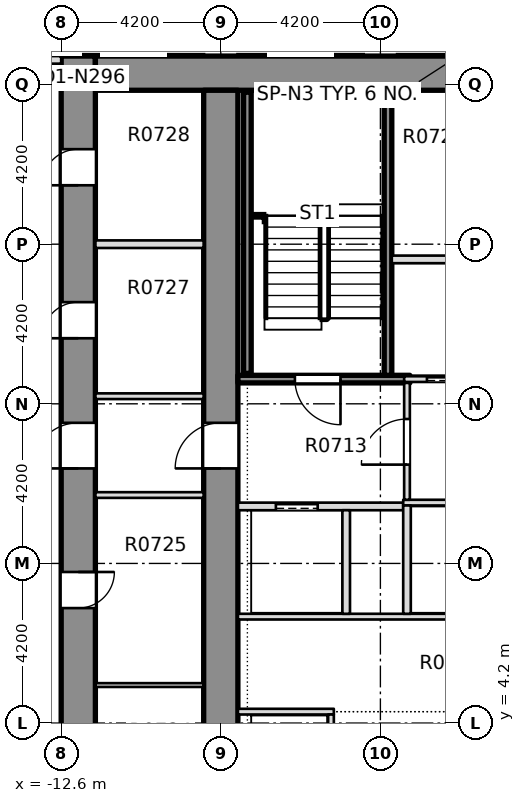
"""IFC4 building model, lengths in metres.
Left out: names, types, materials, properties, quantities, classifications, styles, units other than length and angle.
Written with IfcOpenShell. Run it as: python <this file> out.ifc"""

import sys

from ifc_helpers import new_model, si_unit, direction, frame, frame_2d, origin, place, context, subcontext, project, spatial, rectangle, extrude, element, fill, save


model = new_model("IFC4")
c1 = context("Model", 3, precision=1e-05, world=origin(), true_north=direction((0.0, 1.0)))
c2 = subcontext(c1, "Body", "Model", "MODEL_VIEW")
j1 = project(units=[si_unit("LENGTHUNIT", "METRE"), si_unit("PLANEANGLEUNIT", "RADIAN")], contexts=[c1])
p1 = place(None, origin())
s1 = spatial("IfcSite", under=j1, at=p1, CompositionType="ELEMENT")
p2 = place(p1, origin())
s2 = spatial("IfcBuilding", under=s1, at=p2, CompositionType="ELEMENT")
p3 = place(p2, frame((0.0, 0.0, 37.95)))
s3 = spatial("IfcBuildingStorey", under=s2, at=p3, CompositionType="ELEMENT", Elevation=37.95)
p4 = place(p3, frame((-12.15, -8.4, -0.32), z_axis=(0.0, 0.0, 1.0), x_axis=(0.0, 1.0, 0.0)))
e1 = element("IfcWall", 1, at=p4, inside=s3, PredefinedType="SHEAR", context=c2, shape_type="SweptSolid", body=[
    extrude(rectangle(XDim=30.15, YDim=0.9, at=frame_2d((15.075, 0.0))), origin(), (0.0, 0.0, 1.0), 3.45),
])
p5 = place(p4, frame((3.425, 0.0, 0.32)))
e2 = element("IfcOpeningElement", 2, at=p5, cuts=e1, PredefinedType="OPENING", context=c2, shape_type="SweptSolid", body=[
    extrude(rectangle(XDim=0.95, YDim=2.1, at=frame_2d((0.475, 1.05))), frame((0.0, 0.46, 0.0), z_axis=(0.0, -1.0, 0.0), x_axis=(1.0, 0.0, 0.0)), (0.0, 0.0, 1.0), 0.92),
])
p6 = place(p4, frame((8.075, 0.0, 0.32)))
e3 = element("IfcOpeningElement", 3, at=p6, cuts=e1, PredefinedType="OPENING", context=c2, shape_type="SweptSolid", body=[
    extrude(rectangle(XDim=0.95, YDim=2.1, at=frame_2d((0.475, 1.05))), frame((0.0, 0.46, 0.0), z_axis=(0.0, -1.0, 0.0), x_axis=(1.0, 0.0, 0.0)), (0.0, 0.0, 1.0), 0.92),
])
p7 = place(p4, frame((11.425, 0.0, 0.32)))
e4 = element("IfcOpeningElement", 4, at=p7, cuts=e1, PredefinedType="OPENING", context=c2, shape_type="SweptSolid", body=[
    extrude(rectangle(XDim=0.95, YDim=2.1, at=frame_2d((0.475, 1.05))), frame((0.0, 0.46, 0.0), z_axis=(0.0, -1.0, 0.0), x_axis=(1.0, 0.0, 0.0)), (0.0, 0.0, 1.0), 0.92),
])
p8 = place(p4, frame((15.625, 0.0, 0.32)))
e5 = element("IfcOpeningElement", 5, at=p8, cuts=e1, PredefinedType="OPENING", context=c2, shape_type="SweptSolid", body=[
    extrude(rectangle(XDim=0.95, YDim=2.1, at=frame_2d((0.475, 1.05))), frame((0.0, 0.46, 0.0), z_axis=(0.0, -1.0, 0.0), x_axis=(1.0, 0.0, 0.0)), (0.0, 0.0, 1.0), 0.92),
])
p9 = place(p4, frame((22.725, 0.0, 0.32)))
e6 = element("IfcOpeningElement", 6, at=p9, cuts=e1, PredefinedType="OPENING", context=c2, shape_type="SweptSolid", body=[
    extrude(rectangle(XDim=0.95, YDim=2.1, at=frame_2d((0.475, 1.05))), frame((0.0, 0.46, 0.0), z_axis=(0.0, -1.0, 0.0), x_axis=(1.0, 0.0, 0.0)), (0.0, 0.0, 1.0), 0.92),
])
p10 = place(p4, frame((26.75, 0.0, 0.32)))
e7 = element("IfcOpeningElement", 7, at=p10, cuts=e1, PredefinedType="OPENING", context=c2, shape_type="SweptSolid", body=[
    extrude(rectangle(XDim=0.95, YDim=2.1, at=frame_2d((0.475, 1.05))), frame((0.0, 0.46, 0.0), z_axis=(0.0, -1.0, 0.0), x_axis=(1.0, 0.0, 0.0)), (0.0, 0.0, 1.0), 0.92),
])
p11 = place(p4, frame((19.3, 0.0, 0.32)))
e8 = element("IfcOpeningElement", 8, at=p11, cuts=e1, PredefinedType="OPENING", context=c2, shape_type="SweptSolid", body=[
    extrude(rectangle(XDim=1.2, YDim=2.1, at=frame_2d((0.6, 1.05))), frame((0.0, 0.46, 0.0), z_axis=(0.0, -1.0, 0.0), x_axis=(1.0, 0.0, 0.0)), (0.0, 0.0, 1.0), 0.92),
])
p12 = place(p3, frame((-11.7, 21.3, -0.32), z_axis=(0.0, 0.0, 1.0), x_axis=(1.0, 0.0, 0.0)))
e9 = element("IfcWall", 9, at=p12, inside=s3, PredefinedType="SOLIDWALL", context=c2, shape_type="SweptSolid", body=[
    extrude(rectangle(XDim=23.4, YDim=0.9, at=frame_2d((11.7, 0.0))), origin(), (0.0, 0.0, 1.0), 3.45),
])
p13 = place(p3, frame((-8.4, -7.5, -0.32), z_axis=(0.0, 0.0, 1.0), x_axis=(0.0, 1.0, 0.0)))
e10 = element("IfcWall", 10, at=p13, inside=s3, PredefinedType="SHEAR", context=c2, shape_type="SweptSolid", body=[
    extrude(rectangle(XDim=28.35, YDim=0.9, at=frame_2d((14.175, 0.0))), origin(), (0.0, 0.0, 1.0), 3.45),
])
p14 = place(p13, frame((18.4, 0.0, 0.32)))
e11 = element("IfcOpeningElement", 11, at=p14, cuts=e10, PredefinedType="OPENING", context=c2, shape_type="SweptSolid", body=[
    extrude(rectangle(XDim=1.2, YDim=2.1, at=frame_2d((0.6, 1.05))), frame((0.0, 0.46, 0.0), z_axis=(0.0, -1.0, 0.0), x_axis=(1.0, 0.0, 0.0)), (0.0, 0.0, 1.0), 0.92),
])
p15 = place(p3, frame((-12.6, 21.65, 0.0), z_axis=(0.0, 0.0, 1.0), x_axis=(-1.0, 0.0, 0.0)))
e12 = element("IfcWall", 12, at=p15, inside=s3, PredefinedType="STANDARD", context=c2, shape_type="SweptSolid", body=[
    extrude(rectangle(XDim=3.5, YDim=0.2, at=frame_2d((1.75, 0.0))), origin(), (0.0, 0.0, 1.0), 3.13),
])
p16 = place(p15, frame((0.3, 0.0, 0.2)))
e13 = element("IfcOpeningElement", 13, at=p16, cuts=e12, PredefinedType="OPENING", context=c2, shape_type="SweptSolid", body=[
    extrude(rectangle(XDim=1.8, YDim=2.65, at=frame_2d((0.9, 1.325))), frame((0.0, 0.11, 0.0), z_axis=(0.0, -1.0, 0.0), x_axis=(1.0, 0.0, 0.0)), (0.0, 0.0, 1.0), 0.22),
])
p17 = place(p15, frame((2.3, 0.0, 0.0)))
e14 = element("IfcOpeningElement", 14, at=p17, cuts=e12, PredefinedType="OPENING", context=c2, shape_type="SweptSolid", body=[
    extrude(rectangle(XDim=1.0, YDim=2.4, at=frame_2d((0.5, 1.2))), frame((0.0, 0.11, 0.0), z_axis=(0.0, -1.0, 0.0), x_axis=(1.0, 0.0, 0.0)), (0.0, 0.0, 1.0), 0.22),
])
p18 = place(p3, frame((-7.949, 4.5, 0.0), z_axis=(0.0, 0.0, 1.0), x_axis=(1.0, 0.0, 0.0)))
e15 = element("IfcWall", 15, at=p18, inside=s3, PredefinedType="PARTITIONING", context=c2, shape_type="SweptSolid", body=[
    extrude(rectangle(XDim=2.524, YDim=0.15, at=frame_2d((1.262, 0.0))), origin(), (0.0, 0.0, 1.0), 3.13),
])
p19 = place(p3, frame((-7.949, 7.0, 0.0), z_axis=(0.0, 0.0, 1.0), x_axis=(1.0, 0.0, 0.0)))
e16 = element("IfcWall", 16, at=p19, inside=s3, PredefinedType="PARTITIONING", context=c2, shape_type="SweptSolid", body=[
    extrude(rectangle(XDim=15.898, YDim=0.15, at=frame_2d((7.949, 0.0))), origin(), (0.0, 0.0, 1.0), 3.13),
])
p20 = place(p19, frame((7.249, 0.0, 0.0)))
e17 = element("IfcOpeningElement", 17, at=p20, cuts=e16, PredefinedType="OPENING", context=c2, shape_type="SweptSolid", body=[
    extrude(rectangle(XDim=1.4, YDim=2.1, at=frame_2d((0.7, 1.05))), frame((0.0, 0.085, 0.0), z_axis=(0.0, -1.0, 0.0), x_axis=(1.0, 0.0, 0.0)), (0.0, 0.0, 1.0), 0.17),
])
p21 = place(p3, frame((-7.949, 9.9, 0.0), z_axis=(0.0, 0.0, 1.0), x_axis=(1.0, 0.0, 0.0)))
e18 = element("IfcWall", 18, at=p21, inside=s3, PredefinedType="PARTITIONING", context=c2, shape_type="SweptSolid", body=[
    extrude(rectangle(XDim=4.349, YDim=0.2, at=frame_2d((2.174, 0.0))), origin(), (0.0, 0.0, 1.0), 3.13),
])
p22 = place(p21, frame((0.999, 0.0, 0.0)))
e19 = element("IfcOpeningElement", 19, at=p22, cuts=e18, PredefinedType="OPENING", context=c2, shape_type="SweptSolid", body=[
    extrude(rectangle(XDim=1.1, YDim=2.1, at=frame_2d((0.55, 1.05))), frame((0.0, 0.11, 0.0), z_axis=(0.0, -1.0, 0.0), x_axis=(1.0, 0.0, 0.0)), (0.0, 0.0, 1.0), 0.22),
])
p23 = place(p3, frame((-3.6, 10.0, 0.0), z_axis=(0.0, 0.0, 1.0), x_axis=(1.0, 0.0, 0.0)))
e20 = element("IfcWall", 20, at=p23, inside=s3, PredefinedType="PARTITIONING", context=c2, shape_type="SweptSolid", body=[
    extrude(rectangle(XDim=7.2, YDim=0.15, at=frame_2d((3.6, 0.0))), origin(), (0.0, 0.0, 1.0), 3.13),
])
p24 = place(p23, frame((2.9, 0.0, 0.0)))
e21 = element("IfcOpeningElement", 21, at=p24, cuts=e20, PredefinedType="OPENING", context=c2, shape_type="SweptSolid", body=[
    extrude(rectangle(XDim=1.4, YDim=2.1, at=frame_2d((0.7, 1.05))), frame((0.0, 0.085, 0.0), z_axis=(0.0, -1.0, 0.0), x_axis=(1.0, 0.0, 0.0)), (0.0, 0.0, 1.0), 0.17),
])
p25 = place(p3, frame((-7.949, 13.25, 0.0), z_axis=(0.0, 0.0, 1.0), x_axis=(1.0, 0.0, 0.0)))
e22 = element("IfcWall", 22, at=p25, inside=s3, PredefinedType="SOLIDWALL", context=c2, shape_type="SweptSolid", body=[
    extrude(rectangle(XDim=4.524, YDim=0.2, at=frame_2d((2.262, 0.0))), origin(), (0.0, 0.0, 1.0), 3.13),
])
p26 = place(p25, frame((1.499, 0.0, 0.0)))
e23 = element("IfcOpeningElement", 23, at=p26, cuts=e22, PredefinedType="OPENING", context=c2, shape_type="SweptSolid", body=[
    extrude(rectangle(XDim=1.2, YDim=2.1, at=frame_2d((0.6, 1.05))), frame((0.0, 0.11, 0.0), z_axis=(0.0, -1.0, 0.0), x_axis=(1.0, 0.0, 0.0)), (0.0, 0.0, 1.0), 0.22),
])
p27 = place(p3, frame((-3.575, 13.25, 0.0), z_axis=(0.0, 0.0, 1.0), x_axis=(1.0, 0.0, 0.0)))
e24 = element("IfcWall", 24, at=p27, inside=s3, PredefinedType="PARTITIONING", context=c2, shape_type="SweptSolid", body=[
    extrude(rectangle(XDim=7.15, YDim=0.15, at=frame_2d((3.575, 0.0))), origin(), (0.0, 0.0, 1.0), 3.13),
])
p28 = place(p27, frame((0.6, 0.0, 0.0)))
e25 = element("IfcOpeningElement", 25, at=p28, cuts=e24, PredefinedType="OPENING", context=c2, shape_type="SweptSolid", body=[
    extrude(rectangle(XDim=1.2, YDim=2.1, at=frame_2d((0.6, 1.05))), frame((0.0, 0.085, 0.0), z_axis=(0.0, -1.0, 0.0), x_axis=(1.0, 0.0, 0.0)), (0.0, 0.0, 1.0), 0.17),
])
p29 = place(p27, frame((5.4, 0.0, 0.0)))
e26 = element("IfcOpeningElement", 26, at=p29, cuts=e24, PredefinedType="OPENING", context=c2, shape_type="SweptSolid", body=[
    extrude(rectangle(XDim=1.1, YDim=2.1, at=frame_2d((0.55, 1.05))), frame((0.0, 0.085, 0.0), z_axis=(0.0, -1.0, 0.0), x_axis=(1.0, 0.0, 0.0)), (0.0, 0.0, 1.0), 0.17),
])
p30 = place(p27, frame((2.975, 0.0, 0.0)))
e27 = element("IfcOpeningElement", 27, at=p30, cuts=e24, PredefinedType="OPENING", context=c2, shape_type="SweptSolid", body=[
    extrude(rectangle(XDim=1.2, YDim=2.1, at=frame_2d((0.6, 1.05))), frame((0.0, 0.085, 0.0), z_axis=(0.0, -1.0, 0.0), x_axis=(1.0, 0.0, 0.0)), (0.0, 0.0, 1.0), 0.17),
])
p31 = place(p3, frame((-3.9, 16.4, 0.0), z_axis=(0.0, 0.0, 1.0), x_axis=(1.0, 0.0, 0.0)))
e28 = element("IfcWall", 28, at=p31, inside=s3, PredefinedType="PARTITIONING", context=c2, shape_type="SweptSolid", body=[
    extrude(rectangle(XDim=3.05, YDim=0.2, at=frame_2d((1.525, 0.0))), origin(), (0.0, 0.0, 1.0), 3.13),
])
p32 = place(p3, frame((-5.5, -7.499, 0.0), z_axis=(0.0, 0.0, 1.0), x_axis=(0.0, 1.0, 0.0)))
e29 = element("IfcWall", 29, at=p32, inside=s3, PredefinedType="PARTITIONING", context=c2, shape_type="SweptSolid", body=[
    extrude(rectangle(XDim=11.924, YDim=0.15, at=frame_2d((5.962, 0.0))), origin(), (0.0, 0.0, 1.0), 3.13),
])
p33 = place(p32, frame((0.949, 0.0, 0.0)))
e30 = element("IfcOpeningElement", 30, at=p33, cuts=e29, PredefinedType="OPENING", context=c2, shape_type="SweptSolid", body=[
    extrude(rectangle(XDim=1.1, YDim=2.1, at=frame_2d((0.55, 1.05))), frame((0.0, 0.085, 0.0), z_axis=(0.0, -1.0, 0.0), x_axis=(1.0, 0.0, 0.0)), (0.0, 0.0, 1.0), 0.17),
])
p34 = place(p32, frame((3.949, 0.0, 0.0)))
e31 = element("IfcOpeningElement", 31, at=p34, cuts=e29, PredefinedType="OPENING", context=c2, shape_type="SweptSolid", body=[
    extrude(rectangle(XDim=1.1, YDim=2.1, at=frame_2d((0.55, 1.05))), frame((0.0, 0.085, 0.0), z_axis=(0.0, -1.0, 0.0), x_axis=(1.0, 0.0, 0.0)), (0.0, 0.0, 1.0), 0.17),
])
p35 = place(p32, frame((6.949, 0.0, 0.0)))
e32 = element("IfcOpeningElement", 32, at=p35, cuts=e29, PredefinedType="OPENING", context=c2, shape_type="SweptSolid", body=[
    extrude(rectangle(XDim=1.1, YDim=2.1, at=frame_2d((0.55, 1.05))), frame((0.0, 0.085, 0.0), z_axis=(0.0, -1.0, 0.0), x_axis=(1.0, 0.0, 0.0)), (0.0, 0.0, 1.0), 0.17),
])
p36 = place(p32, frame((9.949, 0.0, 0.0)))
e33 = element("IfcOpeningElement", 33, at=p36, cuts=e29, PredefinedType="OPENING", context=c2, shape_type="SweptSolid", body=[
    extrude(rectangle(XDim=1.1, YDim=2.1, at=frame_2d((0.55, 1.05))), frame((0.0, 0.085, 0.0), z_axis=(0.0, -1.0, 0.0), x_axis=(1.0, 0.0, 0.0)), (0.0, 0.0, 1.0), 0.17),
])
p37 = place(p3, frame((-5.1, 7.075, 0.0), z_axis=(0.0, 0.0, 1.0), x_axis=(0.0, 1.0, 0.0)))
e34 = element("IfcWall", 34, at=p37, inside=s3, PredefinedType="PARTITIONING", context=c2, shape_type="SweptSolid", body=[
    extrude(rectangle(XDim=2.725, YDim=0.2, at=frame_2d((1.363, 0.0))), origin(), (0.0, 0.0, 1.0), 3.13),
])
p38 = place(p3, frame((-4.0, 13.35, 0.0), z_axis=(0.0, 0.0, 1.0), x_axis=(0.0, 1.0, 0.0)))
e35 = element("IfcWall", 35, at=p38, inside=s3, PredefinedType="SOLIDWALL", context=c2, shape_type="SweptSolid", body=[
    extrude(rectangle(XDim=7.499, YDim=0.2, at=frame_2d((3.75, 0.0))), origin(), (0.0, 0.0, 1.0), 3.13),
])
p39 = place(p3, frame((-3.5, 7.075, 0.0), z_axis=(0.0, 0.0, 1.0), x_axis=(0.0, 1.0, 0.0)))
e36 = element("IfcWall", 36, at=p39, inside=s3, PredefinedType="PARTITIONING", context=c2, shape_type="SweptSolid", body=[
    extrude(rectangle(XDim=2.85, YDim=0.2, at=frame_2d((1.425, 0.0))), origin(), (0.0, 0.0, 1.0), 3.13),
])
p40 = place(p3, frame((-3.5, 10.075, 0.0), z_axis=(0.0, 0.0, 1.0), x_axis=(0.0, 1.0, 0.0)))
e37 = element("IfcWall", 37, at=p40, inside=s3, PredefinedType="PARTITIONING", context=c2, shape_type="SweptSolid", body=[
    extrude(rectangle(XDim=3.075, YDim=0.15, at=frame_2d((1.538, 0.0))), origin(), (0.0, 0.0, 1.0), 3.13),
])
p41 = place(p40, frame((0.925, 0.0, 0.0)))
e38 = element("IfcOpeningElement", 38, at=p41, cuts=e37, PredefinedType="OPENING", context=c2, shape_type="SweptSolid", body=[
    extrude(rectangle(XDim=1.2, YDim=2.1, at=frame_2d((0.6, 1.05))), frame((0.0, 0.085, 0.0), z_axis=(0.0, -1.0, 0.0), x_axis=(1.0, 0.0, 0.0)), (0.0, 0.0, 1.0), 0.17),
])
p42 = place(p3, frame((-11.699, 5.2, 0.0), z_axis=(0.0, 0.0, 1.0), x_axis=(1.0, 0.0, 0.0)))
e39 = element("IfcWall", 39, at=p42, inside=s3, PredefinedType="PARTITIONING", context=c2, shape_type="SweptSolid", body=[
    extrude(rectangle(XDim=2.848, YDim=0.1, at=frame_2d((1.424, 0.0))), origin(), (0.0, 0.0, 1.0), 3.13),
])
for number, where, z_axis, x_axis in (
    (40, (-11.699, 10.2, 0.0), (0.0, 0.0, 1.0), (1.0, 0.0, 0.0)),
    (41, (-11.699, 12.8, 0.0), (0.0, 0.0, 1.0), (1.0, 0.0, 0.0)),
):
    element("IfcWall", number, at=place(p3, frame(where, z_axis=z_axis, x_axis=x_axis)), inside=s3, PredefinedType="PARTITIONING", context=c2, shape_type="SweptSolid", body=[
        extrude(rectangle(XDim=2.848, YDim=0.15, at=frame_2d((1.424, 0.0))), origin(), (0.0, 0.0, 1.0), 3.13),
    ])
p43 = place(p3, frame((-11.699, 16.8, 0.0), z_axis=(0.0, 0.0, 1.0), x_axis=(1.0, 0.0, 0.0)))
e42 = element("IfcWall", 42, at=p43, inside=s3, PredefinedType="PARTITIONING", context=c2, shape_type="SweptSolid", body=[
    extrude(rectangle(XDim=2.848, YDim=0.2, at=frame_2d((1.424, 0.0))), origin(), (0.0, 0.0, 1.0), 3.13),
])
p44 = place(p3, frame((-7.7, 13.4, 0.0), z_axis=(0.0, 0.0, 1.0), x_axis=(0.0, 1.0, 0.0)))
e43 = element("IfcWall", 43, at=p44, inside=s3, PredefinedType="SOLIDWALL", context=c2, shape_type="SweptSolid", body=[
    extrude(rectangle(XDim=7.4, YDim=0.2, at=frame_2d((3.7, 0.0))), origin(), (0.0, 0.0, 1.0), 3.13),
])
p45 = place(p26, origin())
e44 = element("IfcDoor", 44, at=p45, inside=s3, OperationType="SINGLE_SWING_LEFT", PredefinedType="DOOR", context=c2, shape_type="SweptSolid", body=[
    extrude(rectangle(XDim=1.2, YDim=2.1, at=frame_2d((0.6, 1.05))), frame((0.0, 0.025, 0.0), z_axis=(0.0, -1.0, 0.0), x_axis=(1.0, 0.0, 0.0)), (0.0, 0.0, 1.0), 0.05),
])
fill(e23, e44)
p46 = place(p22, origin())
e45 = element("IfcDoor", 45, at=p46, inside=s3, OperationType="SLIDING_TO_RIGHT", PredefinedType="DOOR", context=c2, shape_type="SweptSolid", body=[
    extrude(rectangle(XDim=1.1, YDim=2.1, at=frame_2d((0.55, 1.05))), frame((0.0, 0.025, 0.0), z_axis=(0.0, -1.0, 0.0), x_axis=(1.0, 0.0, 0.0)), (0.0, 0.0, 1.0), 0.05),
])
fill(e19, e45)
p47 = place(p28, origin())
e46 = element("IfcDoor", 46, at=p47, inside=s3, OperationType="SLIDING_TO_RIGHT", PredefinedType="DOOR", context=c2, shape_type="SweptSolid", body=[
    extrude(rectangle(XDim=1.2, YDim=2.1, at=frame_2d((0.6, 1.05))), frame((0.0, 0.025, 0.0), z_axis=(0.0, -1.0, 0.0), x_axis=(1.0, 0.0, 0.0)), (0.0, 0.0, 1.0), 0.05),
])
fill(e25, e46)
p48 = place(p41, origin())
e47 = element("IfcDoor", 47, at=p48, inside=s3, OperationType="SINGLE_SWING_RIGHT", PredefinedType="DOOR", context=c2, shape_type="SweptSolid", body=[
    extrude(rectangle(XDim=1.2, YDim=2.1, at=frame_2d((0.6, 1.05))), frame((0.0, 0.025, 0.0), z_axis=(0.0, -1.0, 0.0), x_axis=(1.0, 0.0, 0.0)), (0.0, 0.0, 1.0), 0.05),
])
fill(e38, e47)
p49 = place(p8, origin())
e48 = element("IfcDoor", 48, at=p49, inside=s3, OperationType="SINGLE_SWING_LEFT", PredefinedType="DOOR", context=c2, shape_type="SweptSolid", body=[
    extrude(rectangle(XDim=0.95, YDim=2.1, at=frame_2d((0.475, 1.05))), frame((0.0, 0.025, 0.0), z_axis=(0.0, -1.0, 0.0), x_axis=(1.0, 0.0, 0.0)), (0.0, 0.0, 1.0), 0.05),
])
fill(e5, e48)
p50 = place(p9, origin())
e49 = element("IfcDoor", 49, at=p50, inside=s3, OperationType="SINGLE_SWING_LEFT", PredefinedType="DOOR", context=c2, shape_type="SweptSolid", body=[
    extrude(rectangle(XDim=0.95, YDim=2.1, at=frame_2d((0.475, 1.05))), frame((0.0, 0.025, 0.0), z_axis=(0.0, -1.0, 0.0), x_axis=(1.0, 0.0, 0.0)), (0.0, 0.0, 1.0), 0.05),
])
fill(e6, e49)
p51 = place(p10, origin())
e50 = element("IfcDoor", 50, at=p51, inside=s3, OperationType="SINGLE_SWING_LEFT", PredefinedType="DOOR", context=c2, shape_type="SweptSolid", body=[
    extrude(rectangle(XDim=0.95, YDim=2.1, at=frame_2d((0.475, 1.05))), frame((0.0, 0.025, 0.0), z_axis=(0.0, -1.0, 0.0), x_axis=(1.0, 0.0, 0.0)), (0.0, 0.0, 1.0), 0.05),
])
fill(e7, e50)
p52 = place(p11, origin())
e51 = element("IfcDoor", 51, at=p52, inside=s3, OperationType="SINGLE_SWING_LEFT", PredefinedType="DOOR", context=c2, shape_type="SweptSolid", body=[
    extrude(rectangle(XDim=1.2, YDim=2.1, at=frame_2d((0.6, 1.05))), frame((0.0, 0.025, 0.0), z_axis=(0.0, -1.0, 0.0), x_axis=(1.0, 0.0, 0.0)), (0.0, 0.0, 1.0), 0.05),
])
fill(e8, e51)
p53 = place(p14, origin())
e52 = element("IfcDoor", 52, at=p53, inside=s3, OperationType="SINGLE_SWING_LEFT", PredefinedType="DOOR", context=c2, shape_type="SweptSolid", body=[
    extrude(rectangle(XDim=1.2, YDim=2.1, at=frame_2d((0.6, 1.05))), frame((0.0, 0.025, 0.0), z_axis=(0.0, -1.0, 0.0), x_axis=(1.0, 0.0, 0.0)), (0.0, 0.0, 1.0), 0.05),
])
fill(e11, e52)
save(model, sys.argv[1])
